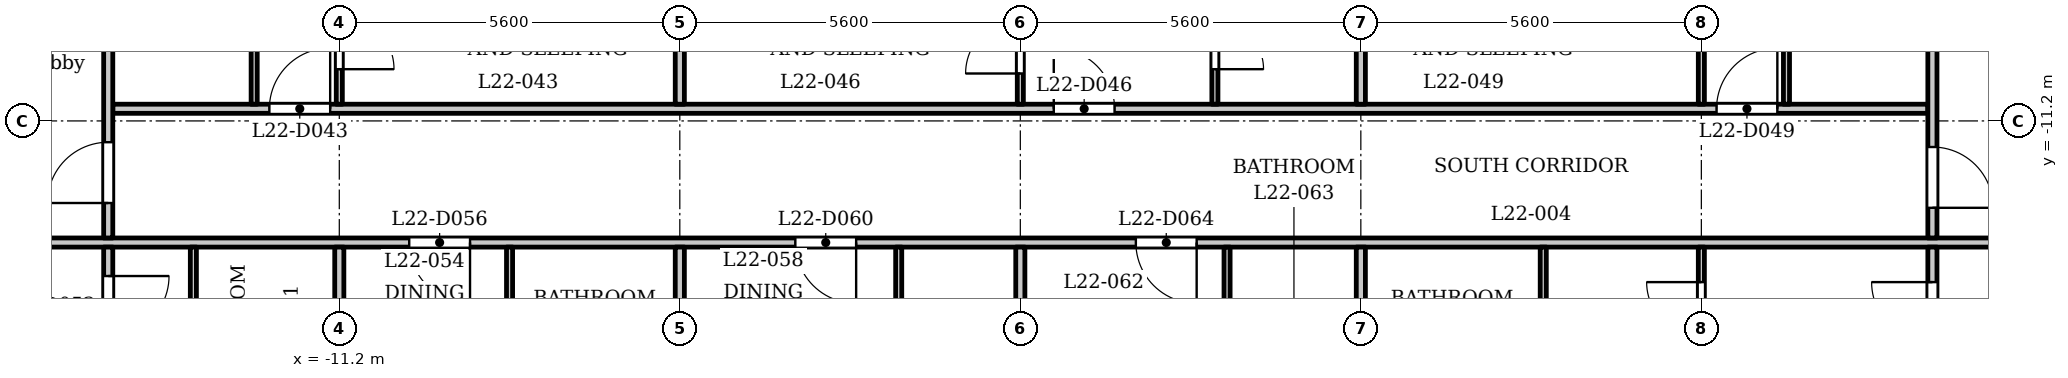
"""IFC4 building model, lengths in metres.
Left out: names, types, materials, properties, quantities, classifications, styles, units other than length and angle.
Written with IfcOpenShell. Run it as: python <this file> out.ifc"""

import sys

from ifc_helpers import new_model, si_unit, direction, frame, frame_2d, origin, place, context, subcontext, project, spatial, rectangle, extrude, element, fill, save


model = new_model("IFC4")
c1 = context("Model", 3, precision=1e-05, world=origin(), true_north=direction((0.0, 1.0)))
c2 = subcontext(c1, "Body", "Model", "MODEL_VIEW")
j1 = project(units=[si_unit("LENGTHUNIT", "METRE"), si_unit("PLANEANGLEUNIT", "RADIAN")], contexts=[c1])
p1 = place(None, origin())
s1 = spatial("IfcSite", under=j1, at=p1, CompositionType="ELEMENT")
p2 = place(p1, origin())
s2 = spatial("IfcBuilding", under=s1, at=p2, CompositionType="ELEMENT")
p3 = place(p2, frame((0.0, 0.0, 90.3)))
s3 = spatial("IfcBuildingStorey", under=s2, at=p3, CompositionType="ELEMENT", Elevation=90.3)
p4 = place(p3, frame((-17.4, -13.2, 0.0), z_axis=(0.0, 0.0, 1.0), x_axis=(1.0, 0.0, 0.0)))
e1 = element("IfcWall", 1, at=p4, inside=s3, PredefinedType="PARTITIONING", context=c2, shape_type="SweptSolid", body=[
    extrude(rectangle(XDim=34.8, YDim=0.15, at=frame_2d((17.4, 0.0))), origin(), (0.0, 0.0, 1.0), 3.2),
])
p5 = place(p4, frame((0.15, 0.0, 0.0)))
e2 = element("IfcOpeningElement", 2, at=p5, cuts=e1, PredefinedType="OPENING", context=c2, shape_type="SweptSolid", body=[
    extrude(rectangle(XDim=1.0, YDim=2.1, at=frame_2d((0.5, 1.05))), frame((0.0, 0.085, 0.0), z_axis=(0.0, -1.0, 0.0), x_axis=(1.0, 0.0, 0.0)), (0.0, 0.0, 1.0), 0.17),
])
p6 = place(p4, frame((33.55, 0.0, 0.0)))
e3 = element("IfcOpeningElement", 3, at=p6, cuts=e1, PredefinedType="OPENING", context=c2, shape_type="SweptSolid", body=[
    extrude(rectangle(XDim=1.0, YDim=2.1, at=frame_2d((0.5, 1.05))), frame((0.0, 0.085, 0.0), z_axis=(0.0, -1.0, 0.0), x_axis=(1.0, 0.0, 0.0)), (0.0, 0.0, 1.0), 0.17),
])
p7 = place(p4, frame((7.35, 0.0, 0.0)))
e4 = element("IfcOpeningElement", 4, at=p7, cuts=e1, PredefinedType="OPENING", context=c2, shape_type="SweptSolid", body=[
    extrude(rectangle(XDim=1.0, YDim=2.1, at=frame_2d((0.5, 1.05))), frame((0.0, 0.085, 0.0), z_axis=(0.0, -1.0, 0.0), x_axis=(1.0, 0.0, 0.0)), (0.0, 0.0, 1.0), 0.17),
])
p8 = place(p4, frame((13.7, 0.0, 0.0)))
e5 = element("IfcOpeningElement", 5, at=p8, cuts=e1, PredefinedType="OPENING", context=c2, shape_type="SweptSolid", body=[
    extrude(rectangle(XDim=1.0, YDim=2.1, at=frame_2d((0.5, 1.05))), frame((0.0, 0.085, 0.0), z_axis=(0.0, -1.0, 0.0), x_axis=(1.0, 0.0, 0.0)), (0.0, 0.0, 1.0), 0.17),
])
p9 = place(p4, frame((19.3, 0.0, 0.0)))
e6 = element("IfcOpeningElement", 6, at=p9, cuts=e1, PredefinedType="OPENING", context=c2, shape_type="SweptSolid", body=[
    extrude(rectangle(XDim=1.0, YDim=2.1, at=frame_2d((0.5, 1.05))), frame((0.0, 0.085, 0.0), z_axis=(0.0, -1.0, 0.0), x_axis=(1.0, 0.0, 0.0)), (0.0, 0.0, 1.0), 0.17),
])
p10 = place(p3, frame((-14.925, -11.0, 0.0), z_axis=(0.0, 0.0, 1.0), x_axis=(1.0, 0.0, 0.0)))
e7 = element("IfcWall", 7, at=p10, inside=s3, PredefinedType="PARTITIONING", context=c2, shape_type="SweptSolid", body=[
    extrude(rectangle(XDim=29.85, YDim=0.15, at=frame_2d((14.925, 0.0))), origin(), (0.0, 0.0, 1.0), 3.2),
])
p11 = place(p10, frame((2.575, 0.0, 0.0)))
e8 = element("IfcOpeningElement", 8, at=p11, cuts=e7, PredefinedType="OPENING", context=c2, shape_type="SweptSolid", body=[
    extrude(rectangle(XDim=1.0, YDim=2.1, at=frame_2d((0.5, 1.05))), frame((0.0, 0.085, 0.0), z_axis=(0.0, -1.0, 0.0), x_axis=(1.0, 0.0, 0.0)), (0.0, 0.0, 1.0), 0.17),
])
p12 = place(p10, frame((15.475, 0.0, 0.0)))
e9 = element("IfcOpeningElement", 9, at=p12, cuts=e7, PredefinedType="OPENING", context=c2, shape_type="SweptSolid", body=[
    extrude(rectangle(XDim=1.0, YDim=2.1, at=frame_2d((0.5, 1.05))), frame((0.0, 0.085, 0.0), z_axis=(0.0, -1.0, 0.0), x_axis=(1.0, 0.0, 0.0)), (0.0, 0.0, 1.0), 0.17),
])
p13 = place(p10, frame((26.375, 0.0, 0.0)))
e10 = element("IfcOpeningElement", 10, at=p13, cuts=e7, PredefinedType="OPENING", context=c2, shape_type="SweptSolid", body=[
    extrude(rectangle(XDim=1.0, YDim=2.1, at=frame_2d((0.5, 1.05))), frame((0.0, 0.085, 0.0), z_axis=(0.0, -1.0, 0.0), x_axis=(1.0, 0.0, 0.0)), (0.0, 0.0, 1.0), 0.17),
])
p14 = place(p3, frame((-15.0, -15.325, 0.0), z_axis=(0.0, 0.0, 1.0), x_axis=(0.0, 1.0, 0.0)))
e11 = element("IfcWall", 11, at=p14, inside=s3, PredefinedType="PARTITIONING", context=c2, shape_type="SweptSolid", body=[
    extrude(rectangle(XDim=2.05, YDim=0.15, at=frame_2d((1.025, 0.0))), origin(), (0.0, 0.0, 1.0), 3.2),
])
p15 = place(p14, frame((0.574, 0.0, 0.0)))
e12 = element("IfcOpeningElement", 12, at=p15, cuts=e11, PredefinedType="OPENING", context=c2, shape_type="SweptSolid", body=[
    extrude(rectangle(XDim=1.0, YDim=2.1, at=frame_2d((0.5, 1.05))), frame((0.0, 0.085, 0.0), z_axis=(0.0, -1.0, 0.0), x_axis=(1.0, 0.0, 0.0)), (0.0, 0.0, 1.0), 0.17),
])
p16 = place(p3, frame((-15.0, -13.125, 0.0), z_axis=(0.0, 0.0, 1.0), x_axis=(0.0, 1.0, 0.0)))
e13 = element("IfcWall", 13, at=p16, inside=s3, PredefinedType="PARTITIONING", context=c2, shape_type="SweptSolid", body=[
    extrude(rectangle(XDim=6.356, YDim=0.15, at=frame_2d((3.178, 0.0))), origin(), (0.0, 0.0, 1.0), 3.2),
])
p17 = place(p16, frame((0.575, 0.0, 0.0)))
e14 = element("IfcOpeningElement", 14, at=p17, cuts=e13, PredefinedType="OPENING", context=c2, shape_type="SweptSolid", body=[
    extrude(rectangle(XDim=1.0, YDim=2.1, at=frame_2d((0.5, 1.05))), frame((0.0, 0.085, 0.0), z_axis=(0.0, -1.0, 0.0), x_axis=(1.0, 0.0, 0.0)), (0.0, 0.0, 1.0), 0.17),
])
p18 = place(p3, frame((-13.6, -16.45, 0.0), z_axis=(0.0, 0.0, 1.0), x_axis=(0.0, 1.0, 0.0)))
e15 = element("IfcWall", 15, at=p18, inside=s3, PredefinedType="PARTITIONING", context=c2, shape_type="SweptSolid", body=[
    extrude(rectangle(XDim=3.175, YDim=0.1, at=frame_2d((1.587, 0.0))), origin(), (0.0, 0.0, 1.0), 3.2),
])
p19 = place(p3, frame((-12.6, -10.925, 0.0), z_axis=(0.0, 0.0, 1.0), x_axis=(0.0, 1.0, 0.0)))
e16 = element("IfcWall", 16, at=p19, inside=s3, PredefinedType="PARTITIONING", context=c2, shape_type="SweptSolid", body=[
    extrude(rectangle(XDim=3.605, YDim=0.1, at=frame_2d((1.802, 0.0))), origin(), (0.0, 0.0, 1.0), 3.2),
])
p20 = place(p19, frame((1.105, 0.0, 0.0)))
e17 = element("IfcOpeningElement", 17, at=p20, cuts=e16, PredefinedType="OPENING", context=c2, shape_type="SweptSolid", body=[
    extrude(rectangle(XDim=0.8, YDim=2.1, at=frame_2d((0.4, 1.05))), frame((0.0, 0.06, 0.0), z_axis=(0.0, -1.0, 0.0), x_axis=(1.0, 0.0, 0.0)), (0.0, 0.0, 1.0), 0.12),
])
p21 = place(p3, frame((-11.2, -10.925, 0.0), z_axis=(0.0, 0.0, 1.0), x_axis=(0.0, 1.0, 0.0)))
e18 = element("IfcWall", 18, at=p21, inside=s3, PredefinedType="PARTITIONING", context=c2, shape_type="SweptSolid", body=[
    extrude(rectangle(XDim=3.605, YDim=0.1, at=frame_2d((1.802, 0.0))), origin(), (0.0, 0.0, 1.0), 3.2),
])
p22 = place(p21, frame((0.576, 0.0, 0.0)))
e19 = element("IfcOpeningElement", 19, at=p22, cuts=e18, PredefinedType="OPENING", context=c2, shape_type="SweptSolid", body=[
    extrude(rectangle(XDim=0.9, YDim=2.1, at=frame_2d((0.45, 1.05))), frame((0.0, 0.06, 0.0), z_axis=(0.0, -1.0, 0.0), x_axis=(1.0, 0.0, 0.0)), (0.0, 0.0, 1.0), 0.12),
])
p23 = place(p3, frame((-11.2, -16.45, 0.0), z_axis=(0.0, 0.0, 1.0), x_axis=(0.0, 1.0, 0.0)))
e20 = element("IfcWall", 20, at=p23, inside=s3, PredefinedType="PARTITIONING", context=c2, shape_type="SweptSolid", body=[
    extrude(rectangle(XDim=3.175, YDim=0.15, at=frame_2d((1.587, 0.0))), origin(), (0.0, 0.0, 1.0), 3.2),
])
p24 = place(p3, frame((-8.4, -16.45, 0.0), z_axis=(0.0, 0.0, 1.0), x_axis=(0.0, 1.0, 0.0)))
e21 = element("IfcWall", 21, at=p24, inside=s3, PredefinedType="PARTITIONING", context=c2, shape_type="SweptSolid", body=[
    extrude(rectangle(XDim=3.175, YDim=0.1, at=frame_2d((1.587, 0.0))), origin(), (0.0, 0.0, 1.0), 3.2),
])
p25 = place(p3, frame((-5.6, -16.45, 0.0), z_axis=(0.0, 0.0, 1.0), x_axis=(0.0, 1.0, 0.0)))
e22 = element("IfcWall", 22, at=p25, inside=s3, PredefinedType="PARTITIONING", context=c2, shape_type="SweptSolid", body=[
    extrude(rectangle(XDim=3.175, YDim=0.15, at=frame_2d((1.587, 0.0))), origin(), (0.0, 0.0, 1.0), 3.2),
])
p26 = place(p3, frame((-5.6, -10.925, 0.0), z_axis=(0.0, 0.0, 1.0), x_axis=(0.0, 1.0, 0.0)))
e23 = element("IfcWall", 23, at=p26, inside=s3, PredefinedType="PARTITIONING", context=c2, shape_type="SweptSolid", body=[
    extrude(rectangle(XDim=3.605, YDim=0.15, at=frame_2d((1.802, 0.0))), origin(), (0.0, 0.0, 1.0), 3.2),
])
p27 = place(p3, frame((-2.0, -16.45, 0.0), z_axis=(0.0, 0.0, 1.0), x_axis=(0.0, 1.0, 0.0)))
e24 = element("IfcWall", 24, at=p27, inside=s3, PredefinedType="PARTITIONING", context=c2, shape_type="SweptSolid", body=[
    extrude(rectangle(XDim=3.175, YDim=0.1, at=frame_2d((1.587, 0.0))), origin(), (0.0, 0.0, 1.0), 3.2),
])
p28 = place(p3, frame((0.0, -10.925, 0.0), z_axis=(0.0, 0.0, 1.0), x_axis=(0.0, 1.0, 0.0)))
e25 = element("IfcWall", 25, at=p28, inside=s3, PredefinedType="PARTITIONING", context=c2, shape_type="SweptSolid", body=[
    extrude(rectangle(XDim=3.605, YDim=0.1, at=frame_2d((1.802, 0.0))), origin(), (0.0, 0.0, 1.0), 3.2),
])
p29 = place(p28, frame((0.505, 0.0, 0.0)))
e26 = element("IfcOpeningElement", 26, at=p29, cuts=e25, PredefinedType="OPENING", context=c2, shape_type="SweptSolid", body=[
    extrude(rectangle(XDim=0.9, YDim=2.1, at=frame_2d((0.45, 1.05))), frame((0.0, 0.06, 0.0), z_axis=(0.0, -1.0, 0.0), x_axis=(1.0, 0.0, 0.0)), (0.0, 0.0, 1.0), 0.12),
])
p30 = place(p3, frame((0.0, -16.45, 0.0), z_axis=(0.0, 0.0, 1.0), x_axis=(0.0, 1.0, 0.0)))
e27 = element("IfcWall", 27, at=p30, inside=s3, PredefinedType="PARTITIONING", context=c2, shape_type="SweptSolid", body=[
    extrude(rectangle(XDim=3.175, YDim=0.15, at=frame_2d((1.587, 0.0))), origin(), (0.0, 0.0, 1.0), 3.2),
])
p31 = place(p3, frame((3.2, -10.925, 0.0), z_axis=(0.0, 0.0, 1.0), x_axis=(0.0, 1.0, 0.0)))
e28 = element("IfcWall", 28, at=p31, inside=s3, PredefinedType="PARTITIONING", context=c2, shape_type="SweptSolid", body=[
    extrude(rectangle(XDim=3.605, YDim=0.1, at=frame_2d((1.802, 0.0))), origin(), (0.0, 0.0, 1.0), 3.2),
])
p32 = place(p31, frame((0.576, 0.0, 0.0)))
e29 = element("IfcOpeningElement", 29, at=p32, cuts=e28, PredefinedType="OPENING", context=c2, shape_type="SweptSolid", body=[
    extrude(rectangle(XDim=0.8, YDim=2.1, at=frame_2d((0.4, 1.05))), frame((0.0, 0.06, 0.0), z_axis=(0.0, -1.0, 0.0), x_axis=(1.0, 0.0, 0.0)), (0.0, 0.0, 1.0), 0.12),
])
p33 = place(p3, frame((3.4, -16.45, 0.0), z_axis=(0.0, 0.0, 1.0), x_axis=(0.0, 1.0, 0.0)))
e30 = element("IfcWall", 30, at=p33, inside=s3, PredefinedType="PARTITIONING", context=c2, shape_type="SweptSolid", body=[
    extrude(rectangle(XDim=3.175, YDim=0.1, at=frame_2d((1.587, 0.0))), origin(), (0.0, 0.0, 1.0), 3.2),
])
p34 = place(p3, frame((5.6, -16.45, 0.0), z_axis=(0.0, 0.0, 1.0), x_axis=(0.0, 1.0, 0.0)))
e31 = element("IfcWall", 31, at=p34, inside=s3, PredefinedType="PARTITIONING", context=c2, shape_type="SweptSolid", body=[
    extrude(rectangle(XDim=3.175, YDim=0.15, at=frame_2d((1.587, 0.0))), origin(), (0.0, 0.0, 1.0), 3.2),
])
p35 = place(p3, frame((5.6, -10.925, 0.0), z_axis=(0.0, 0.0, 1.0), x_axis=(0.0, 1.0, 0.0)))
e32 = element("IfcWall", 32, at=p35, inside=s3, PredefinedType="PARTITIONING", context=c2, shape_type="SweptSolid", body=[
    extrude(rectangle(XDim=3.605, YDim=0.15, at=frame_2d((1.802, 0.0))), origin(), (0.0, 0.0, 1.0), 3.2),
])
p36 = place(p3, frame((8.6, -16.45, 0.0), z_axis=(0.0, 0.0, 1.0), x_axis=(0.0, 1.0, 0.0)))
e33 = element("IfcWall", 33, at=p36, inside=s3, PredefinedType="PARTITIONING", context=c2, shape_type="SweptSolid", body=[
    extrude(rectangle(XDim=3.175, YDim=0.1, at=frame_2d((1.587, 0.0))), origin(), (0.0, 0.0, 1.0), 3.2),
])
p37 = place(p3, frame((11.2, -16.45, 0.0), z_axis=(0.0, 0.0, 1.0), x_axis=(0.0, 1.0, 0.0)))
e34 = element("IfcWall", 34, at=p37, inside=s3, PredefinedType="PARTITIONING", context=c2, shape_type="SweptSolid", body=[
    extrude(rectangle(XDim=3.175, YDim=0.1, at=frame_2d((1.587, 0.0))), origin(), (0.0, 0.0, 1.0), 3.2),
])
p38 = place(p37, frame((1.699, 0.0, 0.0)))
e35 = element("IfcOpeningElement", 35, at=p38, cuts=e34, PredefinedType="OPENING", context=c2, shape_type="SweptSolid", body=[
    extrude(rectangle(XDim=0.9, YDim=2.1, at=frame_2d((0.45, 1.05))), frame((0.0, 0.06, 0.0), z_axis=(0.0, -1.0, 0.0), x_axis=(1.0, 0.0, 0.0)), (0.0, 0.0, 1.0), 0.12),
])
p39 = place(p3, frame((11.2, -10.925, 0.0), z_axis=(0.0, 0.0, 1.0), x_axis=(0.0, 1.0, 0.0)))
e36 = element("IfcWall", 36, at=p39, inside=s3, PredefinedType="PARTITIONING", context=c2, shape_type="SweptSolid", body=[
    extrude(rectangle(XDim=3.605, YDim=0.1, at=frame_2d((1.802, 0.0))), origin(), (0.0, 0.0, 1.0), 3.2),
])
p40 = place(p39, frame((1.005, 0.0, 0.0)))
e37 = element("IfcOpeningElement", 37, at=p40, cuts=e36, PredefinedType="OPENING", context=c2, shape_type="SweptSolid", body=[
    extrude(rectangle(XDim=0.9, YDim=2.1, at=frame_2d((0.45, 1.05))), frame((0.0, 0.06, 0.0), z_axis=(0.0, -1.0, 0.0), x_axis=(1.0, 0.0, 0.0)), (0.0, 0.0, 1.0), 0.12),
])
p41 = place(p3, frame((12.6, -10.925, 0.0), z_axis=(0.0, 0.0, 1.0), x_axis=(0.0, 1.0, 0.0)))
e38 = element("IfcWall", 38, at=p41, inside=s3, PredefinedType="PARTITIONING", context=c2, shape_type="SweptSolid", body=[
    extrude(rectangle(XDim=3.605, YDim=0.1, at=frame_2d((1.802, 0.0))), origin(), (0.0, 0.0, 1.0), 3.2),
])
p42 = place(p41, frame((1.076, 0.0, 0.0)))
e39 = element("IfcOpeningElement", 39, at=p42, cuts=e38, PredefinedType="OPENING", context=c2, shape_type="SweptSolid", body=[
    extrude(rectangle(XDim=0.8, YDim=2.1, at=frame_2d((0.4, 1.05))), frame((0.0, 0.06, 0.0), z_axis=(0.0, -1.0, 0.0), x_axis=(1.0, 0.0, 0.0)), (0.0, 0.0, 1.0), 0.12),
])
p43 = place(p3, frame((15.0, -15.325, 0.0), z_axis=(0.0, 0.0, 1.0), x_axis=(0.0, 1.0, 0.0)))
e40 = element("IfcWall", 40, at=p43, inside=s3, PredefinedType="PARTITIONING", context=c2, shape_type="SweptSolid", body=[
    extrude(rectangle(XDim=2.05, YDim=0.15, at=frame_2d((1.025, 0.0))), origin(), (0.0, 0.0, 1.0), 3.2),
])
p44 = place(p43, frame((0.474, 0.0, 0.0)))
e41 = element("IfcOpeningElement", 41, at=p44, cuts=e40, PredefinedType="OPENING", context=c2, shape_type="SweptSolid", body=[
    extrude(rectangle(XDim=1.0, YDim=2.1, at=frame_2d((0.5, 1.05))), frame((0.0, 0.085, 0.0), z_axis=(0.0, -1.0, 0.0), x_axis=(1.0, 0.0, 0.0)), (0.0, 0.0, 1.0), 0.17),
])
p45 = place(p3, frame((15.0, -13.125, 0.0), z_axis=(0.0, 0.0, 1.0), x_axis=(0.0, 1.0, 0.0)))
e42 = element("IfcWall", 42, at=p45, inside=s3, PredefinedType="PARTITIONING", context=c2, shape_type="SweptSolid", body=[
    extrude(rectangle(XDim=6.356, YDim=0.15, at=frame_2d((3.178, 0.0))), origin(), (0.0, 0.0, 1.0), 3.2),
])
p46 = place(p45, frame((0.496, 0.0, 0.0)))
e43 = element("IfcOpeningElement", 43, at=p46, cuts=e42, PredefinedType="OPENING", context=c2, shape_type="SweptSolid", body=[
    extrude(rectangle(XDim=1.0, YDim=2.1, at=frame_2d((0.5, 1.05))), frame((0.0, 0.085, 0.0), z_axis=(0.0, -1.0, 0.0), x_axis=(1.0, 0.0, 0.0)), (0.0, 0.0, 1.0), 0.17),
])
p47 = place(p17, origin())
e44 = element("IfcDoor", 44, at=p47, inside=s3, OperationType="SINGLE_SWING_RIGHT", PredefinedType="DOOR", context=c2, shape_type="SweptSolid", body=[
    extrude(rectangle(XDim=1.0, YDim=2.1, at=frame_2d((0.5, 1.05))), frame((0.0, 0.025, 0.0), z_axis=(0.0, -1.0, 0.0), x_axis=(1.0, 0.0, 0.0)), (0.0, 0.0, 1.0), 0.05),
])
fill(e14, e44)
p48 = place(p46, origin())
e45 = element("IfcDoor", 45, at=p48, inside=s3, OperationType="SINGLE_SWING_LEFT", PredefinedType="DOOR", context=c2, shape_type="SweptSolid", body=[
    extrude(rectangle(XDim=1.0, YDim=2.1, at=frame_2d((0.5, 1.05))), frame((0.0, 0.025, 0.0), z_axis=(0.0, -1.0, 0.0), x_axis=(1.0, 0.0, 0.0)), (0.0, 0.0, 1.0), 0.05),
])
fill(e43, e45)
p49 = place(p11, origin())
e46 = element("IfcDoor", 46, at=p49, inside=s3, OperationType="SINGLE_SWING_LEFT", PredefinedType="DOOR", context=c2, shape_type="SweptSolid", body=[
    extrude(rectangle(XDim=1.0, YDim=2.1, at=frame_2d((0.5, 1.05))), frame((0.0, 0.025, 0.0), z_axis=(0.0, -1.0, 0.0), x_axis=(1.0, 0.0, 0.0)), (0.0, 0.0, 1.0), 0.05),
])
fill(e8, e46)
p50 = place(p22, origin())
e47 = element("IfcDoor", 47, at=p50, inside=s3, OperationType="SINGLE_SWING_LEFT", PredefinedType="DOOR", context=c2, shape_type="SweptSolid", body=[
    extrude(rectangle(XDim=0.9, YDim=2.1, at=frame_2d((0.45, 1.05))), frame((0.0, 0.025, 0.0), z_axis=(0.0, -1.0, 0.0), x_axis=(1.0, 0.0, 0.0)), (0.0, 0.0, 1.0), 0.05),
])
fill(e19, e47)
p51 = place(p12, origin())
e48 = element("IfcDoor", 48, at=p51, inside=s3, OperationType="SINGLE_SWING_RIGHT", PredefinedType="DOOR", context=c2, shape_type="SweptSolid", body=[
    extrude(rectangle(XDim=1.0, YDim=2.1, at=frame_2d((0.5, 1.05))), frame((0.0, 0.025, 0.0), z_axis=(0.0, -1.0, 0.0), x_axis=(1.0, 0.0, 0.0)), (0.0, 0.0, 1.0), 0.05),
])
fill(e9, e48)
p52 = place(p32, origin())
e49 = element("IfcDoor", 49, at=p52, inside=s3, OperationType="SINGLE_SWING_LEFT", PredefinedType="DOOR", context=c2, shape_type="SweptSolid", body=[
    extrude(rectangle(XDim=0.8, YDim=2.1, at=frame_2d((0.4, 1.05))), frame((0.0, 0.025, 0.0), z_axis=(0.0, -1.0, 0.0), x_axis=(1.0, 0.0, 0.0)), (0.0, 0.0, 1.0), 0.05),
])
fill(e29, e49)
p53 = place(p29, origin())
e50 = element("IfcDoor", 50, at=p53, inside=s3, OperationType="SINGLE_SWING_RIGHT", PredefinedType="DOOR", context=c2, shape_type="SweptSolid", body=[
    extrude(rectangle(XDim=0.9, YDim=2.1, at=frame_2d((0.45, 1.05))), frame((0.0, 0.025, 0.0), z_axis=(0.0, -1.0, 0.0), x_axis=(1.0, 0.0, 0.0)), (0.0, 0.0, 1.0), 0.05),
])
fill(e26, e50)
p54 = place(p13, origin())
e51 = element("IfcDoor", 51, at=p54, inside=s3, OperationType="SINGLE_SWING_LEFT", PredefinedType="DOOR", context=c2, shape_type="SweptSolid", body=[
    extrude(rectangle(XDim=1.0, YDim=2.1, at=frame_2d((0.5, 1.05))), frame((0.0, 0.025, 0.0), z_axis=(0.0, -1.0, 0.0), x_axis=(1.0, 0.0, 0.0)), (0.0, 0.0, 1.0), 0.05),
])
fill(e10, e51)
p55 = place(p15, origin())
e52 = element("IfcDoor", 52, at=p55, inside=s3, OperationType="SINGLE_SWING_RIGHT", PredefinedType="DOOR", context=c2, shape_type="SweptSolid", body=[
    extrude(rectangle(XDim=1.0, YDim=2.1, at=frame_2d((0.5, 1.05))), frame((0.0, 0.025, 0.0), z_axis=(0.0, -1.0, 0.0), x_axis=(1.0, 0.0, 0.0)), (0.0, 0.0, 1.0), 0.05),
])
fill(e12, e52)
p56 = place(p7, origin())
e53 = element("IfcDoor", 53, at=p56, inside=s3, OperationType="SINGLE_SWING_RIGHT", PredefinedType="DOOR", context=c2, shape_type="SweptSolid", body=[
    extrude(rectangle(XDim=1.0, YDim=2.1, at=frame_2d((0.5, 1.05))), frame((0.0, 0.025, 0.0), z_axis=(0.0, -1.0, 0.0), x_axis=(1.0, 0.0, 0.0)), (0.0, 0.0, 1.0), 0.05),
])
fill(e4, e53)
p57 = place(p8, origin())
e54 = element("IfcDoor", 54, at=p57, inside=s3, OperationType="SINGLE_SWING_RIGHT", PredefinedType="DOOR", context=c2, shape_type="SweptSolid", body=[
    extrude(rectangle(XDim=1.0, YDim=2.1, at=frame_2d((0.5, 1.05))), frame((0.0, 0.025, 0.0), z_axis=(0.0, -1.0, 0.0), x_axis=(1.0, 0.0, 0.0)), (0.0, 0.0, 1.0), 0.05),
])
fill(e5, e54)
p58 = place(p9, origin())
e55 = element("IfcDoor", 55, at=p58, inside=s3, OperationType="SINGLE_SWING_RIGHT", PredefinedType="DOOR", context=c2, shape_type="SweptSolid", body=[
    extrude(rectangle(XDim=1.0, YDim=2.1, at=frame_2d((0.5, 1.05))), frame((0.0, 0.025, 0.0), z_axis=(0.0, -1.0, 0.0), x_axis=(1.0, 0.0, 0.0)), (0.0, 0.0, 1.0), 0.05),
])
fill(e6, e55)
p59 = place(p44, origin())
e56 = element("IfcDoor", 56, at=p59, inside=s3, OperationType="SINGLE_SWING_LEFT", PredefinedType="DOOR", context=c2, shape_type="SweptSolid", body=[
    extrude(rectangle(XDim=1.0, YDim=2.1, at=frame_2d((0.5, 1.05))), frame((0.0, 0.025, 0.0), z_axis=(0.0, -1.0, 0.0), x_axis=(1.0, 0.0, 0.0)), (0.0, 0.0, 1.0), 0.05),
])
fill(e41, e56)
p60 = place(p38, origin())
e57 = element("IfcDoor", 57, at=p60, inside=s3, OperationType="SINGLE_SWING_LEFT", PredefinedType="DOOR", context=c2, shape_type="SweptSolid", body=[
    extrude(rectangle(XDim=0.9, YDim=2.1, at=frame_2d((0.45, 1.05))), frame((0.0, 0.025, 0.0), z_axis=(0.0, -1.0, 0.0), x_axis=(1.0, 0.0, 0.0)), (0.0, 0.0, 1.0), 0.05),
])
fill(e35, e57)
save(model, sys.argv[1])
